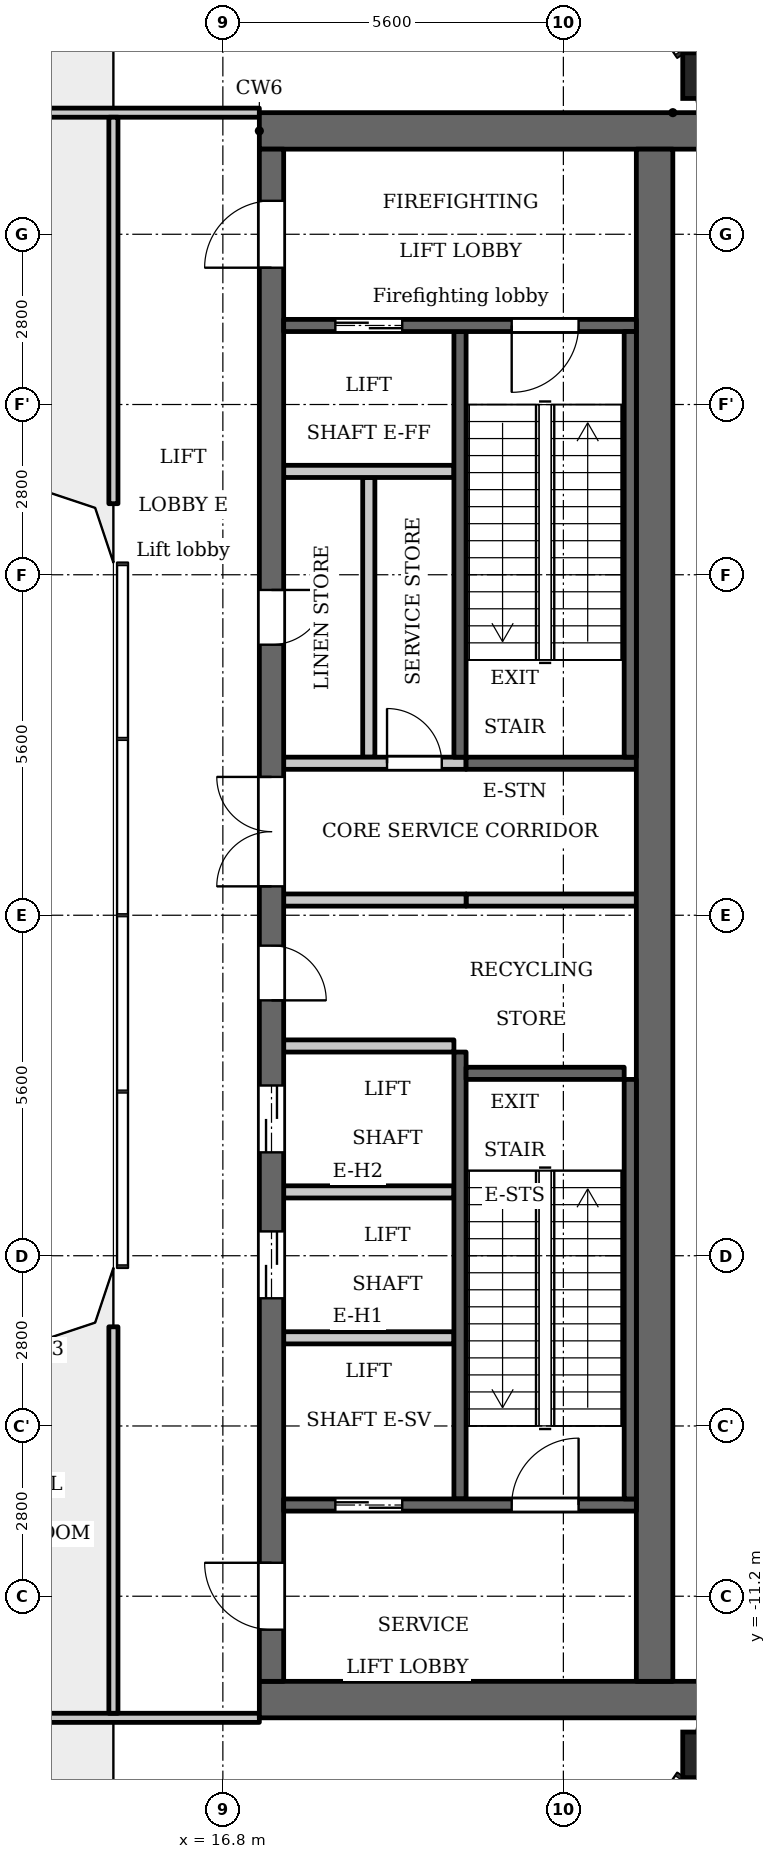
"""IFC4 building model, lengths in metres.
Left out: names, types, materials, properties, quantities, classifications, styles, units other than length and angle.
Written with IfcOpenShell. Run it as: python <this file> out.ifc"""

import sys

from ifc_helpers import new_model, si_unit, direction, frame, frame_2d, origin, origin_2d, place, context, subcontext, project, spatial, polyline, rectangle, outline, extrude, element, fill, save


model = new_model("IFC4")
c1 = context("Model", 3, precision=1e-05, world=origin(), true_north=direction((0.0, 1.0)))
c2 = subcontext(c1, "Body", "Model", "MODEL_VIEW")
j1 = project(units=[si_unit("LENGTHUNIT", "METRE"), si_unit("PLANEANGLEUNIT", "RADIAN")], contexts=[c1])
p1 = place(None, origin())
s1 = spatial("IfcSite", under=j1, at=p1, CompositionType="ELEMENT")
p2 = place(p1, origin())
s2 = spatial("IfcBuilding", under=s1, at=p2, CompositionType="ELEMENT")
p3 = place(p2, frame((0.0, 0.0, 294.5)))
s3 = spatial("IfcBuildingStorey", under=s2, at=p3, CompositionType="ELEMENT", Elevation=294.5)
for number, where, z_axis, x_axis in (
    (1, (24.738, -13.809, 0.0), (0.0, 0.0, 1.0), (1.0, 0.0, 0.0)),
    (2, (24.738, 13.809, 0.0), (0.0, 0.0, 1.0), (1.0, 0.0, 0.0)),
):
    element("IfcColumn", number, at=place(p3, frame(where, z_axis=z_axis, x_axis=x_axis)), inside=s3, PredefinedType="COLUMN", context=c2, shape_type="SweptSolid", body=[
        extrude(rectangle(XDim=0.75, YDim=0.75, at=origin_2d()), origin(), (0.0, 0.0, 1.0), 5.4),
    ])
p4 = place(p3, frame((20.7, 2.6, 0.0), z_axis=(0.0, 0.0, 1.0), x_axis=(0.0, 1.0, 0.0)))
e3 = element("IfcWall", 3, at=p4, inside=s3, PredefinedType="SHEAR", context=c2, shape_type="SweptSolid", body=[
    extrude(rectangle(XDim=7.0, YDim=0.2, at=frame_2d((3.5, 0.0))), origin(), (0.0, 0.0, 1.0), 4.6),
])
p5 = place(p3, frame((20.7, -9.6, 0.0), z_axis=(0.0, 0.0, 1.0), x_axis=(0.0, 1.0, 0.0)))
e4 = element("IfcWall", 4, at=p5, inside=s3, PredefinedType="SHEAR", context=c2, shape_type="SweptSolid", body=[
    extrude(rectangle(XDim=7.35, YDim=0.2, at=frame_2d((3.675, 0.0))), origin(), (0.0, 0.0, 1.0), 4.6),
])
p6 = place(p3, frame((20.8, 2.5, 0.0), z_axis=(0.0, 0.0, 1.0), x_axis=(1.0, 0.0, 0.0)))
e5 = element("IfcWall", 5, at=p6, inside=s3, PredefinedType="SHEAR", context=c2, shape_type="SweptSolid", body=[
    extrude(rectangle(XDim=2.8, YDim=0.2, at=frame_2d((1.4, 0.0))), origin(), (0.0, 0.0, 1.0), 4.6),
])
p7 = place(p3, frame((20.8, 0.25, 0.0), z_axis=(0.0, 0.0, 1.0), x_axis=(1.0, 0.0, 0.0)))
e6 = element("IfcWall", 6, at=p7, inside=s3, PredefinedType="PARTITIONING", context=c2, shape_type="SweptSolid", body=[
    extrude(rectangle(XDim=2.8, YDim=0.2, at=frame_2d((1.4, 0.0))), origin(), (0.0, 0.0, 1.0), 4.6),
])
for number, where, z_axis, x_axis in (
    (7, (17.4, 12.9, 0.0), (0.0, 0.0, 1.0), (1.0, 0.0, 0.0)),
    (8, (17.4, -12.9, 0.0), (0.0, 0.0, 1.0), (1.0, 0.0, 0.0)),
):
    element("IfcWall", number, at=place(p3, frame(where, z_axis=z_axis, x_axis=x_axis)), inside=s3, PredefinedType="SHEAR", context=c2, shape_type="SweptSolid", body=[
        extrude(rectangle(XDim=7.32, YDim=0.6, at=frame_2d((3.66, 0.0))), origin(), (0.0, 0.0, 1.0), 4.6),
    ])
p8 = place(p3, frame((19.2, 2.6, 0.0), z_axis=(0.0, 0.0, 1.0), x_axis=(0.0, 1.0, 0.0)))
e9 = element("IfcWall", 9, at=p8, inside=s3, PredefinedType="PARTITIONING", context=c2, shape_type="SweptSolid", body=[
    extrude(rectangle(XDim=4.6, YDim=0.2, at=frame_2d((2.3, 0.0))), origin(), (0.0, 0.0, 1.0), 4.6),
])
p9 = place(p3, frame((17.6, -12.6, 0.0), z_axis=(0.0, 0.0, 1.0), x_axis=(0.0, 1.0, 0.0)))
e10 = element("IfcWall", 10, at=p9, inside=s3, PredefinedType="SHEAR", context=c2, shape_type="SweptSolid", body=[
    extrude(rectangle(XDim=25.2, YDim=0.4, at=frame_2d((12.6, 0.0))), origin(), (0.0, 0.0, 1.0), 4.6),
])
p10 = place(p9, frame((6.3, 0.0, 0.0)))
e11 = element("IfcOpeningElement", 11, at=p10, cuts=e10, PredefinedType="OPENING", context=c2, shape_type="SweptSolid", body=[
    extrude(rectangle(XDim=1.1, YDim=2.1, at=frame_2d((0.55, 1.05))), frame((0.0, 0.21, 0.0), z_axis=(0.0, -1.0, 0.0), x_axis=(1.0, 0.0, 0.0)), (0.0, 0.0, 1.0), 0.42),
])
p11 = place(p9, frame((8.7, 0.0, 0.0)))
e12 = element("IfcOpeningElement", 12, at=p11, cuts=e10, PredefinedType="OPENING", context=c2, shape_type="SweptSolid", body=[
    extrude(rectangle(XDim=1.1, YDim=2.1, at=frame_2d((0.55, 1.05))), frame((0.0, 0.21, 0.0), z_axis=(0.0, -1.0, 0.0), x_axis=(1.0, 0.0, 0.0)), (0.0, 0.0, 1.0), 0.42),
])
p12 = place(p9, frame((11.2, 0.0, 0.0)))
e13 = element("IfcOpeningElement", 13, at=p12, cuts=e10, PredefinedType="OPENING", context=c2, shape_type="SweptSolid", body=[
    extrude(rectangle(XDim=0.9, YDim=2.1, at=frame_2d((0.45, 1.05))), frame((0.0, 0.21, 0.0), z_axis=(0.0, -1.0, 0.0), x_axis=(1.0, 0.0, 0.0)), (0.0, 0.0, 1.0), 0.42),
])
p13 = place(p9, frame((17.05, 0.0, 0.0)))
e14 = element("IfcOpeningElement", 14, at=p13, cuts=e10, PredefinedType="OPENING", context=c2, shape_type="SweptSolid", body=[
    extrude(rectangle(XDim=0.9, YDim=2.1, at=frame_2d((0.45, 1.05))), frame((0.0, 0.21, 0.0), z_axis=(0.0, -1.0, 0.0), x_axis=(1.0, 0.0, 0.0)), (0.0, 0.0, 1.0), 0.42),
])
p14 = place(p9, frame((23.25, 0.0, 0.0)))
e15 = element("IfcOpeningElement", 15, at=p14, cuts=e10, PredefinedType="OPENING", context=c2, shape_type="SweptSolid", body=[
    extrude(rectangle(XDim=1.1, YDim=2.1, at=frame_2d((0.55, 1.05))), frame((0.0, 0.21, 0.0), z_axis=(0.0, -1.0, 0.0), x_axis=(1.0, 0.0, 0.0)), (0.0, 0.0, 1.0), 0.42),
])
p15 = place(p9, frame((0.85, 0.0, 0.0)))
e16 = element("IfcOpeningElement", 16, at=p15, cuts=e10, PredefinedType="OPENING", context=c2, shape_type="SweptSolid", body=[
    extrude(rectangle(XDim=1.1, YDim=2.1, at=frame_2d((0.55, 1.05))), frame((0.0, 0.21, 0.0), z_axis=(0.0, -1.0, 0.0), x_axis=(1.0, 0.0, 0.0)), (0.0, 0.0, 1.0), 0.42),
])
p16 = place(p9, frame((13.075, 0.0, 0.0)))
e17 = element("IfcOpeningElement", 17, at=p16, cuts=e10, PredefinedType="OPENING", context=c2, shape_type="SweptSolid", body=[
    extrude(rectangle(XDim=1.8, YDim=2.1, at=frame_2d((0.9, 1.05))), frame((0.0, 0.21, 0.0), z_axis=(0.0, -1.0, 0.0), x_axis=(1.0, 0.0, 0.0)), (0.0, 0.0, 1.0), 0.42),
])
p17 = place(p3, frame((23.9, -12.6, 0.0), z_axis=(0.0, 0.0, 1.0), x_axis=(0.0, 1.0, 0.0)))
e18 = element("IfcWall", 18, at=p17, inside=s3, PredefinedType="SHEAR", context=c2, shape_type="SweptSolid", body=[
    extrude(rectangle(XDim=25.2, YDim=0.6, at=frame_2d((12.6, 0.0))), origin(), (0.0, 0.0, 1.0), 4.6),
])
p18 = place(p3, frame((17.8, -9.7, 0.0), z_axis=(0.0, 0.0, 1.0), x_axis=(1.0, 0.0, 0.0)))
e19 = element("IfcWall", 19, at=p18, inside=s3, PredefinedType="SHEAR", context=c2, shape_type="SweptSolid", body=[
    extrude(rectangle(XDim=5.8, YDim=0.2, at=frame_2d((2.9, 0.0))), origin(), (0.0, 0.0, 1.0), 4.6),
])
p19 = place(p18, frame((0.85, 0.0, 0.0)))
e20 = element("IfcOpeningElement", 20, at=p19, cuts=e19, PredefinedType="OPENING", context=c2, shape_type="SweptSolid", body=[
    extrude(rectangle(XDim=1.1, YDim=2.1, at=frame_2d((0.55, 1.05))), frame((0.0, 0.11, 0.0), z_axis=(0.0, -1.0, 0.0), x_axis=(1.0, 0.0, 0.0)), (0.0, 0.0, 1.0), 0.22),
])
p20 = place(p18, frame((3.75, 0.0, 0.0)))
e21 = element("IfcOpeningElement", 21, at=p20, cuts=e19, PredefinedType="OPENING", context=c2, shape_type="SweptSolid", body=[
    extrude(rectangle(XDim=1.1, YDim=2.1, at=frame_2d((0.55, 1.05))), frame((0.0, 0.11, 0.0), z_axis=(0.0, -1.0, 0.0), x_axis=(1.0, 0.0, 0.0)), (0.0, 0.0, 1.0), 0.22),
])
for number, where, z_axis, x_axis in (
    (22, (17.8, -6.95, 0.0), (0.0, 0.0, 1.0), (1.0, 0.0, 0.0)),
    (23, (17.8, -4.55, 0.0), (0.0, 0.0, 1.0), (1.0, 0.0, 0.0)),
    (24, (17.8, -2.15, 0.0), (0.0, 0.0, 1.0), (1.0, 0.0, 0.0)),
):
    element("IfcWall", number, at=place(p3, frame(where, z_axis=z_axis, x_axis=x_axis)), inside=s3, PredefinedType="PARTITIONING", context=c2, shape_type="SweptSolid", body=[
        extrude(rectangle(XDim=2.8, YDim=0.2, at=frame_2d((1.4, 0.0))), origin(), (0.0, 0.0, 1.0), 4.6),
    ])
p21 = place(p3, frame((17.8, 0.25, 0.0), z_axis=(0.0, 0.0, 1.0), x_axis=(1.0, 0.0, 0.0)))
e25 = element("IfcWall", 25, at=p21, inside=s3, PredefinedType="PARTITIONING", context=c2, shape_type="SweptSolid", body=[
    extrude(rectangle(XDim=3.0, YDim=0.2, at=frame_2d((1.5, 0.0))), origin(), (0.0, 0.0, 1.0), 4.6),
])
p22 = place(p3, frame((17.8, 2.5, 0.0), z_axis=(0.0, 0.0, 1.0), x_axis=(1.0, 0.0, 0.0)))
e26 = element("IfcWall", 26, at=p22, inside=s3, PredefinedType="PARTITIONING", context=c2, shape_type="SweptSolid", body=[
    extrude(rectangle(XDim=3.0, YDim=0.2, at=frame_2d((1.5, 0.0))), origin(), (0.0, 0.0, 1.0), 4.6),
])
p23 = place(p22, frame((1.7, 0.0, 0.0)))
e27 = element("IfcOpeningElement", 27, at=p23, cuts=e26, PredefinedType="OPENING", context=c2, shape_type="SweptSolid", body=[
    extrude(rectangle(XDim=0.9, YDim=2.1, at=frame_2d((0.45, 1.05))), frame((0.0, 0.11, 0.0), z_axis=(0.0, -1.0, 0.0), x_axis=(1.0, 0.0, 0.0)), (0.0, 0.0, 1.0), 0.22),
])
p24 = place(p3, frame((17.8, 7.3, 0.0), z_axis=(0.0, 0.0, 1.0), x_axis=(1.0, 0.0, 0.0)))
e28 = element("IfcWall", 28, at=p24, inside=s3, PredefinedType="PARTITIONING", context=c2, shape_type="SweptSolid", body=[
    extrude(rectangle(XDim=2.8, YDim=0.2, at=frame_2d((1.4, 0.0))), origin(), (0.0, 0.0, 1.0), 4.6),
])
p25 = place(p3, frame((17.8, 9.7, 0.0), z_axis=(0.0, 0.0, 1.0), x_axis=(1.0, 0.0, 0.0)))
e29 = element("IfcWall", 29, at=p25, inside=s3, PredefinedType="SHEAR", context=c2, shape_type="SweptSolid", body=[
    extrude(rectangle(XDim=5.8, YDim=0.2, at=frame_2d((2.9, 0.0))), origin(), (0.0, 0.0, 1.0), 4.6),
])
p26 = place(p25, frame((0.85, 0.0, 0.0)))
e30 = element("IfcOpeningElement", 30, at=p26, cuts=e29, PredefinedType="OPENING", context=c2, shape_type="SweptSolid", body=[
    extrude(rectangle(XDim=1.1, YDim=2.1, at=frame_2d((0.55, 1.05))), frame((0.0, 0.11, 0.0), z_axis=(0.0, -1.0, 0.0), x_axis=(1.0, 0.0, 0.0)), (0.0, 0.0, 1.0), 0.22),
])
p27 = place(p25, frame((3.75, 0.0, 0.0)))
e31 = element("IfcOpeningElement", 31, at=p27, cuts=e29, PredefinedType="OPENING", context=c2, shape_type="SweptSolid", body=[
    extrude(rectangle(XDim=1.1, YDim=2.1, at=frame_2d((0.55, 1.05))), frame((0.0, 0.11, 0.0), z_axis=(0.0, -1.0, 0.0), x_axis=(1.0, 0.0, 0.0)), (0.0, 0.0, 1.0), 0.22),
])
p28 = place(p3, frame((23.5, 2.6, 0.0), z_axis=(0.0, 0.0, 1.0), x_axis=(0.0, 1.0, 0.0)))
e32 = element("IfcWall", 32, at=p28, inside=s3, PredefinedType="SHEAR", context=c2, shape_type="SweptSolid", body=[
    extrude(rectangle(XDim=7.0, YDim=0.2, at=frame_2d((3.5, 0.0))), origin(), (0.0, 0.0, 1.0), 4.6),
])
p29 = place(p3, frame((23.5, -9.6, 0.0), z_axis=(0.0, 0.0, 1.0), x_axis=(0.0, 1.0, 0.0)))
e33 = element("IfcWall", 33, at=p29, inside=s3, PredefinedType="SHEAR", context=c2, shape_type="SweptSolid", body=[
    extrude(rectangle(XDim=6.9, YDim=0.2, at=frame_2d((3.45, 0.0))), origin(), (0.0, 0.0, 1.0), 4.6),
])
p30 = place(p3, frame((20.8, -2.6, 0.0), z_axis=(0.0, 0.0, 1.0), x_axis=(1.0, 0.0, 0.0)))
e34 = element("IfcWall", 34, at=p30, inside=s3, PredefinedType="SHEAR", context=c2, shape_type="SweptSolid", body=[
    extrude(rectangle(XDim=2.6, YDim=0.2, at=frame_2d((1.3, 0.0))), origin(), (0.0, 0.0, 1.0), 4.6),
])
p31 = place(p3, frame((-17.4, -13.2, 0.0), z_axis=(0.0, 0.0, 1.0), x_axis=(1.0, 0.0, 0.0)))
e35 = element("IfcWall", 35, at=p31, inside=s3, PredefinedType="PARTITIONING", context=c2, shape_type="SweptSolid", body=[
    extrude(rectangle(XDim=34.8, YDim=0.15, at=frame_2d((17.4, 0.0))), origin(), (0.0, 0.0, 1.0), 4.6),
])
p32 = place(p31, frame((0.65, 0.0, 0.0)))
e36 = element("IfcOpeningElement", 36, at=p32, cuts=e35, PredefinedType="OPENING", context=c2, shape_type="SweptSolid", body=[
    extrude(rectangle(XDim=1.2, YDim=2.1, at=frame_2d((0.6, 1.05))), frame((0.0, 0.085, 0.0), z_axis=(0.0, -1.0, 0.0), x_axis=(1.0, 0.0, 0.0)), (0.0, 0.0, 1.0), 0.17),
])
p33 = place(p31, frame((2.95, 0.0, 0.0)))
e37 = element("IfcOpeningElement", 37, at=p33, cuts=e35, PredefinedType="OPENING", context=c2, shape_type="SweptSolid", body=[
    extrude(rectangle(XDim=1.0, YDim=2.1, at=frame_2d((0.5, 1.05))), frame((0.0, 0.085, 0.0), z_axis=(0.0, -1.0, 0.0), x_axis=(1.0, 0.0, 0.0)), (0.0, 0.0, 1.0), 0.17),
])
p34 = place(p31, frame((24.75, 0.0, 0.0)))
e38 = element("IfcOpeningElement", 38, at=p34, cuts=e35, PredefinedType="OPENING", context=c2, shape_type="SweptSolid", body=[
    extrude(rectangle(XDim=1.8, YDim=2.1, at=frame_2d((0.9, 1.05))), frame((0.0, 0.085, 0.0), z_axis=(0.0, -1.0, 0.0), x_axis=(1.0, 0.0, 0.0)), (0.0, 0.0, 1.0), 0.17),
])
p35 = place(p31, frame((27.75, 0.0, 0.0)))
e39 = element("IfcOpeningElement", 39, at=p35, cuts=e35, PredefinedType="OPENING", context=c2, shape_type="SweptSolid", body=[
    extrude(rectangle(XDim=1.0, YDim=2.1, at=frame_2d((0.5, 1.05))), frame((0.0, 0.085, 0.0), z_axis=(0.0, -1.0, 0.0), x_axis=(1.0, 0.0, 0.0)), (0.0, 0.0, 1.0), 0.17),
])
p36 = place(p3, frame((-17.4, 13.2, 0.0), z_axis=(0.0, 0.0, 1.0), x_axis=(1.0, 0.0, 0.0)))
e40 = element("IfcWall", 40, at=p36, inside=s3, PredefinedType="PARTITIONING", context=c2, shape_type="SweptSolid", body=[
    extrude(rectangle(XDim=34.8, YDim=0.15, at=frame_2d((17.4, 0.0))), origin(), (0.0, 0.0, 1.0), 4.6),
])
p37 = place(p36, frame((0.55, 0.0, 0.0)))
e41 = element("IfcOpeningElement", 41, at=p37, cuts=e40, PredefinedType="OPENING", context=c2, shape_type="SweptSolid", body=[
    extrude(rectangle(XDim=1.2, YDim=2.1, at=frame_2d((0.6, 1.05))), frame((0.0, 0.085, 0.0), z_axis=(0.0, -1.0, 0.0), x_axis=(1.0, 0.0, 0.0)), (0.0, 0.0, 1.0), 0.17),
])
p38 = place(p36, frame((15.05, 0.0, 0.0)))
e42 = element("IfcOpeningElement", 42, at=p38, cuts=e40, PredefinedType="OPENING", context=c2, shape_type="SweptSolid", body=[
    extrude(rectangle(XDim=1.8, YDim=2.1, at=frame_2d((0.9, 1.05))), frame((0.0, 0.085, 0.0), z_axis=(0.0, -1.0, 0.0), x_axis=(1.0, 0.0, 0.0)), (0.0, 0.0, 1.0), 0.17),
])
p39 = place(p36, frame((18.05, 0.0, 0.0)))
e43 = element("IfcOpeningElement", 43, at=p39, cuts=e40, PredefinedType="OPENING", context=c2, shape_type="SweptSolid", body=[
    extrude(rectangle(XDim=1.0, YDim=2.1, at=frame_2d((0.5, 1.05))), frame((0.0, 0.085, 0.0), z_axis=(0.0, -1.0, 0.0), x_axis=(1.0, 0.0, 0.0)), (0.0, 0.0, 1.0), 0.17),
])
for number, where, z_axis, x_axis in (
    (44, (15.0, -13.125, 0.0), (0.0, 0.0, 1.0), (0.0, 1.0, 0.0)),
    (45, (15.0, 6.769, 0.0), (0.0, 0.0, 1.0), (0.0, 1.0, 0.0)),
):
    element("IfcWall", number, at=place(p3, frame(where, z_axis=z_axis, x_axis=x_axis)), inside=s3, PredefinedType="PARTITIONING", context=c2, shape_type="SweptSolid", body=[
        extrude(rectangle(XDim=6.356, YDim=0.15, at=frame_2d((3.178, 0.0))), origin(), (0.0, 0.0, 1.0), 4.6),
    ])
p40 = place(p3, origin())
e46 = element("IfcWall", 46, at=p40, inside=s3, PredefinedType="SOLIDWALL", context=c2, shape_type="SweptSolid", body=[
    extrude(outline(polyline([(14.937, 6.937), (13.849, 7.3), (13.8, 7.3), (13.8, 7.0), (14.7, 6.7), (15.0, 5.8), (15.3, 5.8), (15.3, 5.849), (14.937, 6.937)])), origin(), (0.0, 0.0, 1.0), 4.6),
])
e47 = element("IfcWall", 47, at=p40, inside=s3, PredefinedType="SOLIDWALL", context=c2, shape_type="SweptSolid", body=[
    extrude(outline(polyline([(14.937, -6.937), (15.3, -5.849), (15.3, -5.8), (15.0, -5.8), (14.7, -6.7), (13.8, -7.0), (13.8, -7.3), (13.849, -7.3), (14.937, -6.937)])), origin(), (0.0, 0.0, 1.0), 4.6),
])
p41 = place(p19, origin())
e48 = element("IfcDoor", 48, at=p41, inside=s3, OperationType="DOUBLE_DOOR_SLIDING", PredefinedType="DOOR", context=c2, shape_type="SweptSolid", body=[
    extrude(rectangle(XDim=1.1, YDim=2.1, at=frame_2d((0.55, 1.05))), frame((0.0, 0.025, 0.0), z_axis=(0.0, -1.0, 0.0), x_axis=(1.0, 0.0, 0.0)), (0.0, 0.0, 1.0), 0.05),
])
fill(e20, e48)
p42 = place(p10, origin())
e49 = element("IfcDoor", 49, at=p42, inside=s3, OperationType="DOUBLE_DOOR_SLIDING", PredefinedType="DOOR", context=c2, shape_type="SweptSolid", body=[
    extrude(rectangle(XDim=1.1, YDim=2.1, at=frame_2d((0.55, 1.05))), frame((0.0, 0.025, 0.0), z_axis=(0.0, -1.0, 0.0), x_axis=(1.0, 0.0, 0.0)), (0.0, 0.0, 1.0), 0.05),
])
fill(e11, e49)
p43 = place(p11, origin())
e50 = element("IfcDoor", 50, at=p43, inside=s3, OperationType="DOUBLE_DOOR_SLIDING", PredefinedType="DOOR", context=c2, shape_type="SweptSolid", body=[
    extrude(rectangle(XDim=1.1, YDim=2.1, at=frame_2d((0.55, 1.05))), frame((0.0, 0.025, 0.0), z_axis=(0.0, -1.0, 0.0), x_axis=(1.0, 0.0, 0.0)), (0.0, 0.0, 1.0), 0.05),
])
fill(e12, e50)
p44 = place(p12, origin())
e51 = element("IfcDoor", 51, at=p44, inside=s3, OperationType="SINGLE_SWING_LEFT", PredefinedType="DOOR", context=c2, shape_type="SweptSolid", body=[
    extrude(rectangle(XDim=0.9, YDim=2.1, at=frame_2d((0.45, 1.05))), frame((0.0, 0.025, 0.0), z_axis=(0.0, -1.0, 0.0), x_axis=(1.0, 0.0, 0.0)), (0.0, 0.0, 1.0), 0.05),
])
fill(e13, e51)
p45 = place(p13, origin())
e52 = element("IfcDoor", 52, at=p45, inside=s3, OperationType="SINGLE_SWING_RIGHT", PredefinedType="DOOR", context=c2, shape_type="SweptSolid", body=[
    extrude(rectangle(XDim=0.9, YDim=2.1, at=frame_2d((0.45, 1.05))), frame((0.0, 0.025, 0.0), z_axis=(0.0, -1.0, 0.0), x_axis=(1.0, 0.0, 0.0)), (0.0, 0.0, 1.0), 0.05),
])
fill(e14, e52)
p46 = place(p23, origin())
e53 = element("IfcDoor", 53, at=p46, inside=s3, OperationType="SINGLE_SWING_RIGHT", PredefinedType="DOOR", context=c2, shape_type="SweptSolid", body=[
    extrude(rectangle(XDim=0.9, YDim=2.1, at=frame_2d((0.45, 1.05))), frame((0.0, 0.025, 0.0), z_axis=(0.0, -1.0, 0.0), x_axis=(1.0, 0.0, 0.0)), (0.0, 0.0, 1.0), 0.05),
])
fill(e27, e53)
p47 = place(p26, origin())
e54 = element("IfcDoor", 54, at=p47, inside=s3, OperationType="DOUBLE_DOOR_SLIDING", PredefinedType="DOOR", context=c2, shape_type="SweptSolid", body=[
    extrude(rectangle(XDim=1.1, YDim=2.1, at=frame_2d((0.55, 1.05))), frame((0.0, 0.025, 0.0), z_axis=(0.0, -1.0, 0.0), x_axis=(1.0, 0.0, 0.0)), (0.0, 0.0, 1.0), 0.05),
])
fill(e30, e54)
p48 = place(p14, origin())
e55 = element("IfcDoor", 55, at=p48, inside=s3, OperationType="SINGLE_SWING_RIGHT", PredefinedType="DOOR", context=c2, shape_type="SweptSolid", body=[
    extrude(rectangle(XDim=1.1, YDim=2.1, at=frame_2d((0.55, 1.05))), frame((0.0, 0.025, 0.0), z_axis=(0.0, -1.0, 0.0), x_axis=(1.0, 0.0, 0.0)), (0.0, 0.0, 1.0), 0.05),
])
fill(e15, e55)
p49 = place(p15, origin())
e56 = element("IfcDoor", 56, at=p49, inside=s3, OperationType="SINGLE_SWING_LEFT", PredefinedType="DOOR", context=c2, shape_type="SweptSolid", body=[
    extrude(rectangle(XDim=1.1, YDim=2.1, at=frame_2d((0.55, 1.05))), frame((0.0, 0.025, 0.0), z_axis=(0.0, -1.0, 0.0), x_axis=(1.0, 0.0, 0.0)), (0.0, 0.0, 1.0), 0.05),
])
fill(e16, e56)
p50 = place(p27, origin())
e57 = element("IfcDoor", 57, at=p50, inside=s3, OperationType="SINGLE_SWING_LEFT", PredefinedType="DOOR", context=c2, shape_type="SweptSolid", body=[
    extrude(rectangle(XDim=1.1, YDim=2.1, at=frame_2d((0.55, 1.05))), frame((0.0, 0.025, 0.0), z_axis=(0.0, -1.0, 0.0), x_axis=(1.0, 0.0, 0.0)), (0.0, 0.0, 1.0), 0.05),
])
fill(e31, e57)
p51 = place(p20, origin())
e58 = element("IfcDoor", 58, at=p51, inside=s3, OperationType="SINGLE_SWING_LEFT", PredefinedType="DOOR", context=c2, shape_type="SweptSolid", body=[
    extrude(rectangle(XDim=1.1, YDim=2.1, at=frame_2d((0.55, 1.05))), frame((0.0, 0.025, 0.0), z_axis=(0.0, -1.0, 0.0), x_axis=(1.0, 0.0, 0.0)), (0.0, 0.0, 1.0), 0.05),
])
fill(e21, e58)
p52 = place(p16, origin())
e59 = element("IfcDoor", 59, at=p52, inside=s3, OperationType="DOUBLE_DOOR_SINGLE_SWING", PredefinedType="DOOR", context=c2, shape_type="SweptSolid", body=[
    extrude(rectangle(XDim=1.8, YDim=2.1, at=frame_2d((0.9, 1.05))), frame((0.0, 0.025, 0.0), z_axis=(0.0, -1.0, 0.0), x_axis=(1.0, 0.0, 0.0)), (0.0, 0.0, 1.0), 0.05),
])
fill(e17, e59)
save(model, sys.argv[1])
